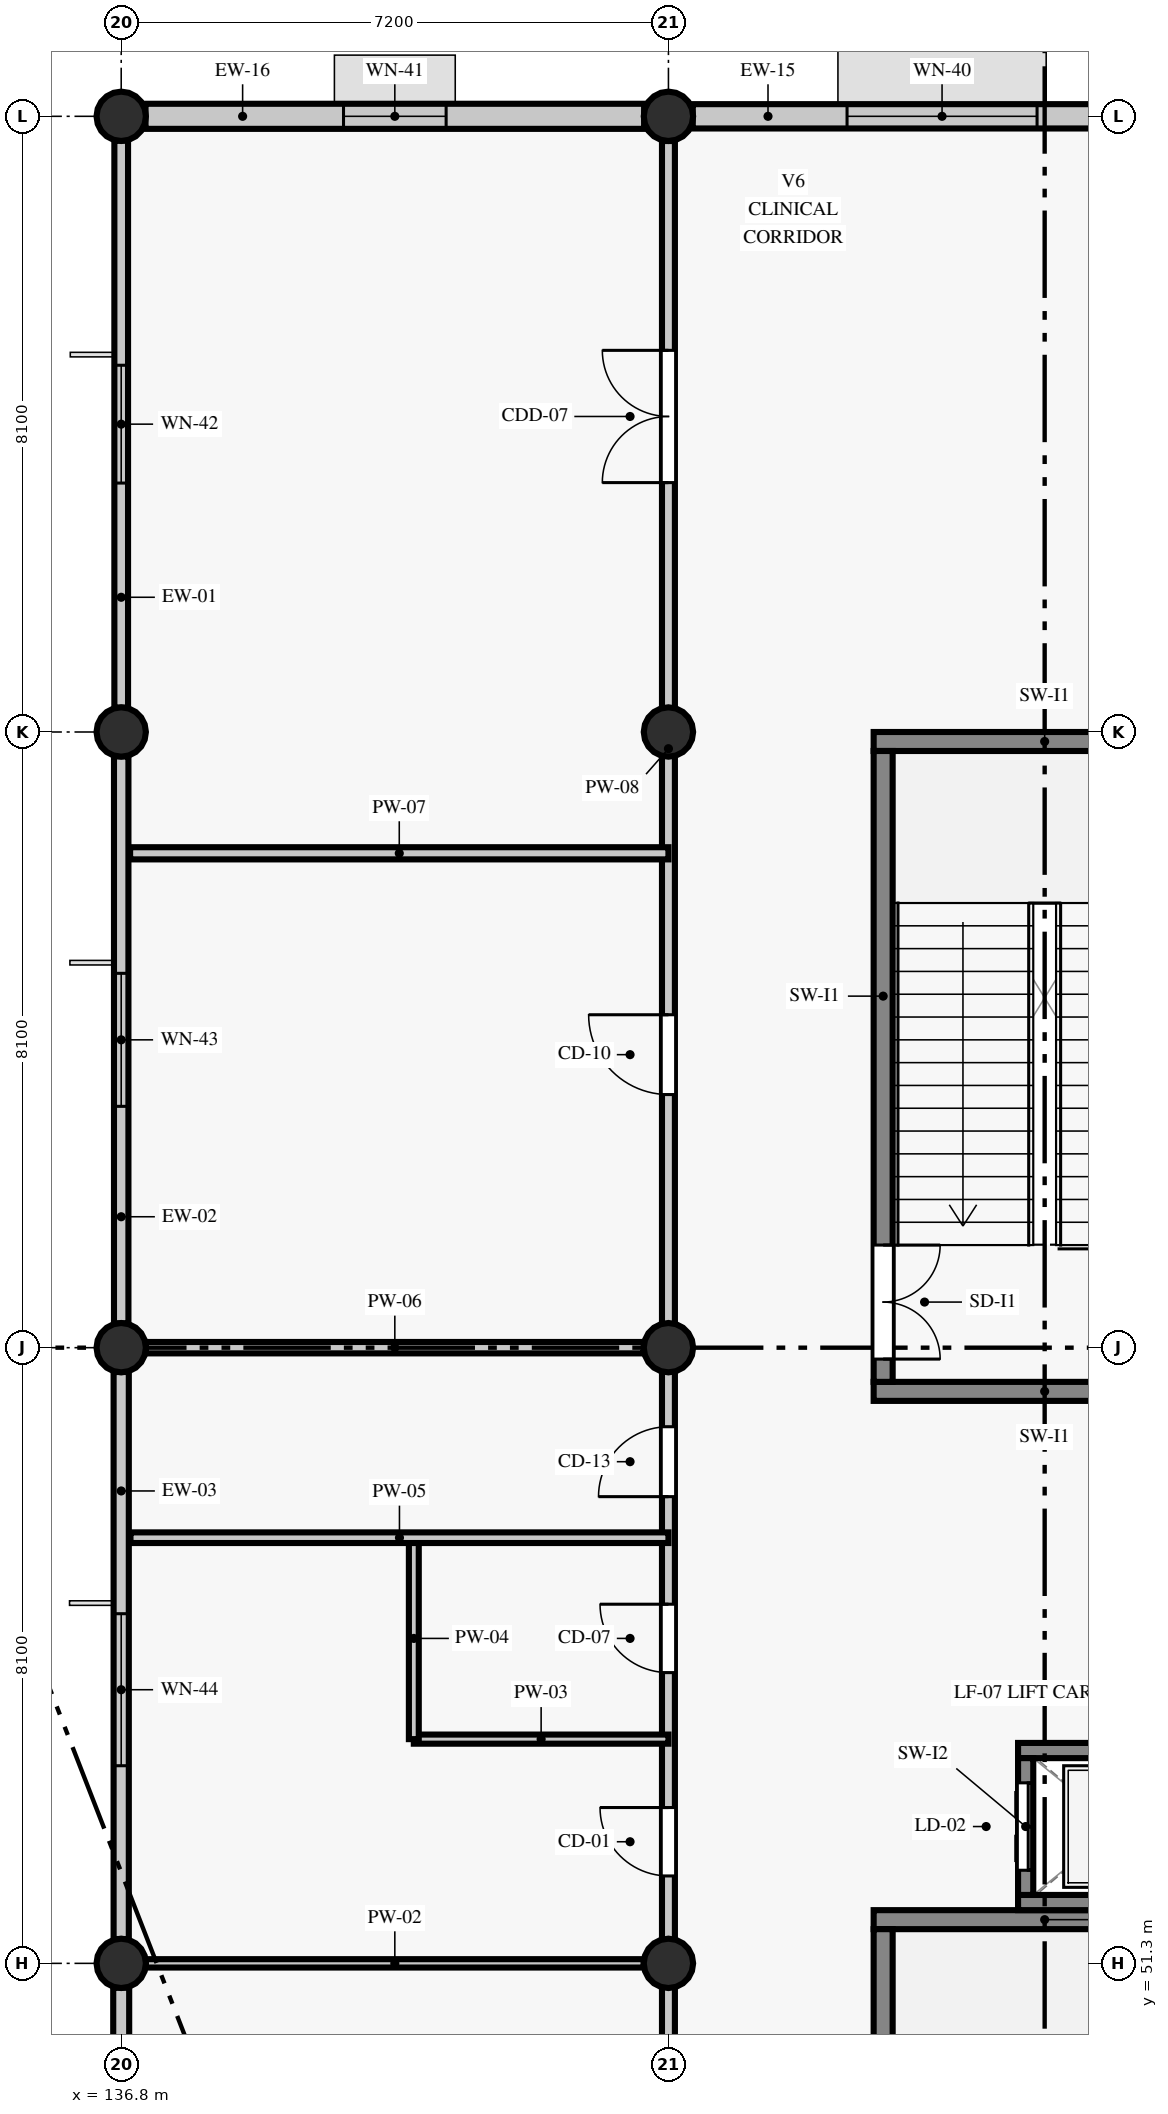
"""IFC4 building model, lengths in metres.
Left out: names, types, materials, properties, quantities, classifications, styles, units other than length and angle.
Written with IfcOpenShell. Run it as: python <this file> out.ifc"""

import sys

from ifc_helpers import new_model, si_unit, direction, frame, frame_2d, origin, origin_2d, place, context, subcontext, project, spatial, rectangle, circle, extrude, element, fill, save


model = new_model("IFC4")
c1 = context("Model", 3, precision=1e-05, world=origin(), true_north=direction((0.0, 1.0)))
c2 = subcontext(c1, "Body", "Model", "MODEL_VIEW")
j1 = project(units=[si_unit("LENGTHUNIT", "METRE"), si_unit("PLANEANGLEUNIT", "RADIAN")], contexts=[c1])
p1 = place(None, origin())
s1 = spatial("IfcSite", under=j1, at=p1, CompositionType="ELEMENT")
p2 = place(p1, origin())
s2 = spatial("IfcBuilding", under=s1, at=p2, CompositionType="ELEMENT")
p3 = place(p2, frame((0.0, 0.0, 4.8)))
s3 = spatial("IfcBuildingStorey", under=s2, at=p3, CompositionType="ELEMENT", Elevation=4.8)
for number, where, z_axis, x_axis in (
    (1, (136.8, 51.3, 0.0), (0.0, 0.0, 1.0), (1.0, 0.0, 0.0)),
    (2, (136.8, 59.4, 0.0), (0.0, 0.0, 1.0), (1.0, 0.0, 0.0)),
):
    element("IfcColumn", number, at=place(p3, frame(where, z_axis=z_axis, x_axis=x_axis)), inside=s3, PredefinedType="COLUMN", context=c2, shape_type="SweptSolid", body=[
        extrude(circle(Radius=0.325, at=origin_2d()), origin(), (0.0, 0.0, 1.0), 4.56),
    ])
for number, where, z_axis, x_axis in (
    (3, (136.8, 67.5, 0.0), (0.0, 0.0, 1.0), (1.0, 0.0, 0.0)),
    (4, (136.8, 75.6, 0.0), (0.0, 0.0, 1.0), (1.0, 0.0, 0.0)),
):
    element("IfcColumn", number, at=place(p3, frame(where, z_axis=z_axis, x_axis=x_axis)), inside=s3, PredefinedType="COLUMN", context=c2, shape_type="SweptSolid", body=[
        extrude(circle(Radius=0.325, at=origin_2d()), origin(), (0.0, 0.0, 1.0), 4.518),
    ])
for number, where, z_axis, x_axis in (
    (5, (144.0, 51.3, 0.0), (0.0, 0.0, 1.0), (1.0, 0.0, 0.0)),
    (6, (144.0, 59.4, 0.0), (0.0, 0.0, 1.0), (1.0, 0.0, 0.0)),
):
    element("IfcColumn", number, at=place(p3, frame(where, z_axis=z_axis, x_axis=x_axis)), inside=s3, PredefinedType="COLUMN", context=c2, shape_type="SweptSolid", body=[
        extrude(circle(Radius=0.325, at=origin_2d()), origin(), (0.0, 0.0, 1.0), 4.56),
    ])
for number, where, z_axis, x_axis in (
    (7, (144.0, 67.5, 0.0), (0.0, 0.0, 1.0), (1.0, 0.0, 0.0)),
    (8, (144.0, 75.6, 0.0), (0.0, 0.0, 1.0), (1.0, 0.0, 0.0)),
):
    element("IfcColumn", number, at=place(p3, frame(where, z_axis=z_axis, x_axis=x_axis)), inside=s3, PredefinedType="COLUMN", context=c2, shape_type="SweptSolid", body=[
        extrude(circle(Radius=0.325, at=origin_2d()), origin(), (0.0, 0.0, 1.0), 4.518),
    ])
p4 = place(p3, frame((150.88, 75.6, 0.0), z_axis=(0.0, 0.0, 1.0), x_axis=(-1.0, 0.0, 0.0)))
e9 = element("IfcWall", 9, at=p4, inside=s3, PredefinedType="STANDARD", context=c2, shape_type="SweptSolid", body=[
    extrude(rectangle(XDim=6.56, YDim=0.32, at=frame_2d((3.28, 0.0))), origin(), (0.0, 0.0, 1.0), 3.868),
])
p5 = place(p4, frame((2.03, 0.0, 0.9)))
e10 = element("IfcOpeningElement", 10, at=p5, cuts=e9, PredefinedType="OPENING", context=c2, shape_type="SweptSolid", body=[
    extrude(rectangle(XDim=2.5, YDim=1.66, at=frame_2d((1.25, 0.83))), frame((0.0, 0.17, 0.0), z_axis=(0.0, -1.0, 0.0), x_axis=(1.0, 0.0, 0.0)), (0.0, 0.0, 1.0), 0.34),
])
p6 = place(p3, frame((143.68, 75.6, 0.0), z_axis=(0.0, 0.0, 1.0), x_axis=(-1.0, 0.0, 0.0)))
e11 = element("IfcWall", 11, at=p6, inside=s3, PredefinedType="STANDARD", context=c2, shape_type="SweptSolid", body=[
    extrude(rectangle(XDim=6.56, YDim=0.33, at=frame_2d((3.28, 0.0))), origin(), (0.0, 0.0, 1.0), 3.868),
])
p7 = place(p6, frame((2.605, 0.0, 0.9)))
e12 = element("IfcOpeningElement", 12, at=p7, cuts=e11, PredefinedType="OPENING", context=c2, shape_type="SweptSolid", body=[
    extrude(rectangle(XDim=1.35, YDim=1.78, at=frame_2d((0.675, 0.89))), frame((0.0, 0.175, 0.0), z_axis=(0.0, -1.0, 0.0), x_axis=(1.0, 0.0, 0.0)), (0.0, 0.0, 1.0), 0.35),
])
p8 = place(p3, frame((136.8, 75.28, 0.0), z_axis=(0.0, 0.0, 1.0), x_axis=(0.0, -1.0, 0.0)))
e13 = element("IfcWall", 13, at=p8, inside=s3, PredefinedType="STANDARD", context=c2, shape_type="SweptSolid", body=[
    extrude(rectangle(XDim=7.46, YDim=0.18, at=frame_2d((3.73, 0.0))), origin(), (0.0, 0.0, 1.0), 3.868),
])
p9 = place(p8, frame((2.955, 0.0, 0.9)))
e14 = element("IfcOpeningElement", 14, at=p9, cuts=e13, PredefinedType="OPENING", context=c2, shape_type="SweptSolid", body=[
    extrude(rectangle(XDim=1.55, YDim=1.78, at=frame_2d((0.775, 0.89))), frame((0.0, 0.1, 0.0), z_axis=(0.0, -1.0, 0.0), x_axis=(1.0, 0.0, 0.0)), (0.0, 0.0, 1.0), 0.2),
])
p10 = place(p3, frame((136.8, 67.18, 0.0), z_axis=(0.0, 0.0, 1.0), x_axis=(0.0, -1.0, 0.0)))
e15 = element("IfcWall", 15, at=p10, inside=s3, PredefinedType="STANDARD", context=c2, shape_type="SweptSolid", body=[
    extrude(rectangle(XDim=7.46, YDim=0.19, at=frame_2d((3.73, 0.0))), origin(), (0.0, 0.0, 1.0), 3.91),
])
p11 = place(p10, frame((2.855, 0.0, 0.9)))
e16 = element("IfcOpeningElement", 16, at=p11, cuts=e15, PredefinedType="OPENING", context=c2, shape_type="SweptSolid", body=[
    extrude(rectangle(XDim=1.75, YDim=1.78, at=frame_2d((0.875, 0.89))), frame((0.0, 0.105, 0.0), z_axis=(0.0, -1.0, 0.0), x_axis=(1.0, 0.0, 0.0)), (0.0, 0.0, 1.0), 0.21),
])
p12 = place(p3, frame((136.8, 59.08, 0.0), z_axis=(0.0, 0.0, 1.0), x_axis=(0.0, -1.0, 0.0)))
e17 = element("IfcWall", 17, at=p12, inside=s3, PredefinedType="STANDARD", context=c2, shape_type="SweptSolid", body=[
    extrude(rectangle(XDim=7.46, YDim=0.2, at=frame_2d((3.73, 0.0))), origin(), (0.0, 0.0, 1.0), 3.91),
])
p13 = place(p12, frame((3.18, 0.0, 0.9)))
e18 = element("IfcOpeningElement", 18, at=p13, cuts=e17, PredefinedType="OPENING", context=c2, shape_type="SweptSolid", body=[
    extrude(rectangle(XDim=2.0, YDim=1.78, at=frame_2d((1.0, 0.89))), frame((0.0, 0.11, 0.0), z_axis=(0.0, -1.0, 0.0), x_axis=(1.0, 0.0, 0.0)), (0.0, 0.0, 1.0), 0.22),
])
p14 = place(p3, frame((136.8, 50.98, 0.0), z_axis=(0.0, 0.0, 1.0), x_axis=(0.0, -1.0, 0.0)))
e19 = element("IfcWall", 19, at=p14, inside=s3, PredefinedType="STANDARD", context=c2, shape_type="SweptSolid", body=[
    extrude(rectangle(XDim=7.46, YDim=0.21, at=frame_2d((3.73, 0.0))), origin(), (0.0, 0.0, 1.0), 3.91),
])
p15 = place(p14, frame((2.605, 0.0, 0.9)))
e20 = element("IfcOpeningElement", 20, at=p15, cuts=e19, PredefinedType="OPENING", context=c2, shape_type="SweptSolid", body=[
    extrude(rectangle(XDim=2.25, YDim=1.78, at=frame_2d((1.125, 0.89))), frame((0.0, 0.115, 0.0), z_axis=(0.0, -1.0, 0.0), x_axis=(1.0, 0.0, 0.0)), (0.0, 0.0, 1.0), 0.23),
])
p16 = place(p3, frame((151.2, 51.875, 0.0), z_axis=(0.0, 0.0, 1.0), x_axis=(-1.0, 0.0, 0.0)))
e21 = element("IfcWall", 21, at=p16, inside=s3, PredefinedType="SHEAR", context=c2, shape_type="SweptSolid", body=[
    extrude(rectangle(XDim=4.5, YDim=0.25, at=frame_2d((2.25, 0.0))), origin(), (0.0, 0.0, 1.0), 4.56),
])
p17 = place(p3, frame((146.825, 51.75, 0.0), z_axis=(0.0, 0.0, 1.0), x_axis=(0.0, -1.0, 0.0)))
e22 = element("IfcWall", 22, at=p17, inside=s3, PredefinedType="SHEAR", context=c2, shape_type="SweptSolid", body=[
    extrude(rectangle(XDim=8.3, YDim=0.25, at=frame_2d((4.15, 0.0))), origin(), (0.0, 0.0, 1.0), 4.56),
])
p18 = place(p17, frame((6.5, 0.0, 0.0)))
e23 = element("IfcOpeningElement", 23, at=p18, cuts=e22, PredefinedType="OPENING", context=c2, shape_type="SweptSolid", body=[
    extrude(rectangle(XDim=1.5, YDim=2.15, at=frame_2d((0.75, 1.075))), frame((0.0, 0.135, 0.0), z_axis=(0.0, -1.0, 0.0), x_axis=(1.0, 0.0, 0.0)), (0.0, 0.0, 1.0), 0.27),
])
for number, where, z_axis, x_axis in (
    (24, (146.7, 58.825, 0.0), (0.0, 0.0, 1.0), (1.0, 0.0, 0.0)),
    (25, (151.2, 67.375, 0.0), (0.0, 0.0, 1.0), (-1.0, 0.0, 0.0)),
):
    element("IfcWall", number, at=place(p3, frame(where, z_axis=z_axis, x_axis=x_axis)), inside=s3, PredefinedType="SHEAR", context=c2, shape_type="SweptSolid", body=[
        extrude(rectangle(XDim=4.5, YDim=0.25, at=frame_2d((2.25, 0.0))), origin(), (0.0, 0.0, 1.0), 4.56),
    ])
p19 = place(p3, frame((146.825, 67.25, 0.0), z_axis=(0.0, 0.0, 1.0), x_axis=(0.0, -1.0, 0.0)))
e26 = element("IfcWall", 26, at=p19, inside=s3, PredefinedType="SHEAR", context=c2, shape_type="SweptSolid", body=[
    extrude(rectangle(XDim=8.3, YDim=0.25, at=frame_2d((4.15, 0.0))), origin(), (0.0, 0.0, 1.0), 4.56),
])
p20 = place(p19, frame((6.5, 0.0, 0.0)))
e27 = element("IfcOpeningElement", 27, at=p20, cuts=e26, PredefinedType="OPENING", context=c2, shape_type="SweptSolid", body=[
    extrude(rectangle(XDim=1.5, YDim=2.15, at=frame_2d((0.75, 1.075))), frame((0.0, 0.135, 0.0), z_axis=(0.0, -1.0, 0.0), x_axis=(1.0, 0.0, 0.0)), (0.0, 0.0, 1.0), 0.27),
])
for number, where, z_axis, x_axis in (
    (28, (148.6, 52.1, 0.0), (0.0, 0.0, 1.0), (1.0, 0.0, 0.0)),
    (29, (151.2, 54.1, 0.0), (0.0, 0.0, 1.0), (-1.0, 0.0, 0.0)),
):
    element("IfcWall", number, at=place(p3, frame(where, z_axis=z_axis, x_axis=x_axis)), inside=s3, PredefinedType="SHEAR", context=c2, shape_type="SweptSolid", body=[
        extrude(rectangle(XDim=2.6, YDim=0.2, at=frame_2d((1.3, 0.0))), origin(), (0.0, 0.0, 1.0), 4.56),
    ])
p21 = place(p3, frame((148.7, 54.0, 0.0), z_axis=(0.0, 0.0, 1.0), x_axis=(0.0, -1.0, 0.0)))
e30 = element("IfcWall", 30, at=p21, inside=s3, PredefinedType="SHEAR", context=c2, shape_type="SweptSolid", body=[
    extrude(rectangle(XDim=1.8, YDim=0.2, at=frame_2d((0.9, 0.0))), origin(), (0.0, 0.0, 1.0), 4.56),
])
p22 = place(p21, frame((0.325, 0.0, 0.0)))
e31 = element("IfcOpeningElement", 31, at=p22, cuts=e30, PredefinedType="OPENING", context=c2, shape_type="SweptSolid", body=[
    extrude(rectangle(XDim=1.15, YDim=2.15, at=frame_2d((0.575, 1.075))), frame((0.0, 0.11, 0.0), z_axis=(0.0, -1.0, 0.0), x_axis=(1.0, 0.0, 0.0)), (0.0, 0.0, 1.0), 0.22),
])
p23 = place(p3, frame((144.0, 43.525, 0.0), z_axis=(0.0, 0.0, 1.0), x_axis=(0.0, 1.0, 0.0)))
e32 = element("IfcWall", 32, at=p23, inside=s3, PredefinedType="PARTITIONING", context=c2, shape_type="SweptSolid", body=[
    extrude(rectangle(XDim=31.75, YDim=0.17, at=frame_2d((15.875, 0.0))), origin(), (0.0, 0.0, 1.0), 4.068),
])
p24 = place(p23, frame((3.218, 0.0, 0.0)))
e33 = element("IfcOpeningElement", 33, at=p24, cuts=e32, PredefinedType="OPENING", context=c2, shape_type="SweptSolid", body=[
    extrude(rectangle(XDim=1.1, YDim=2.08, at=frame_2d((0.55, 1.04))), frame((0.0, 0.095, 0.0), z_axis=(0.0, -1.0, 0.0), x_axis=(1.0, 0.0, 0.0)), (0.0, 0.0, 1.0), 0.19),
])
p25 = place(p23, frame((8.925, 0.0, 0.0)))
e34 = element("IfcOpeningElement", 34, at=p25, cuts=e32, PredefinedType="OPENING", context=c2, shape_type="SweptSolid", body=[
    extrude(rectangle(XDim=0.9, YDim=2.08, at=frame_2d((0.45, 1.04))), frame((0.0, 0.095, 0.0), z_axis=(0.0, -1.0, 0.0), x_axis=(1.0, 0.0, 0.0)), (0.0, 0.0, 1.0), 0.19),
])
p26 = place(p23, frame((11.6, 0.0, 0.0)))
e35 = element("IfcOpeningElement", 35, at=p26, cuts=e32, PredefinedType="OPENING", context=c2, shape_type="SweptSolid", body=[
    extrude(rectangle(XDim=0.9, YDim=2.13, at=frame_2d((0.45, 1.065))), frame((0.0, 0.095, 0.0), z_axis=(0.0, -1.0, 0.0), x_axis=(1.0, 0.0, 0.0)), (0.0, 0.0, 1.0), 0.19),
])
p27 = place(p23, frame((13.915, 0.0, 0.0)))
e36 = element("IfcOpeningElement", 36, at=p27, cuts=e32, PredefinedType="OPENING", context=c2, shape_type="SweptSolid", body=[
    extrude(rectangle(XDim=0.92, YDim=2.18, at=frame_2d((0.46, 1.09))), frame((0.0, 0.095, 0.0), z_axis=(0.0, -1.0, 0.0), x_axis=(1.0, 0.0, 0.0)), (0.0, 0.0, 1.0), 0.19),
])
p28 = place(p23, frame((19.205, 0.0, 0.0)))
e37 = element("IfcOpeningElement", 37, at=p28, cuts=e32, PredefinedType="OPENING", context=c2, shape_type="SweptSolid", body=[
    extrude(rectangle(XDim=1.05, YDim=2.13, at=frame_2d((0.525, 1.065))), frame((0.0, 0.095, 0.0), z_axis=(0.0, -1.0, 0.0), x_axis=(1.0, 0.0, 0.0)), (0.0, 0.0, 1.0), 0.19),
])
p29 = place(p23, frame((27.256, 0.0, 0.0)))
e38 = element("IfcOpeningElement", 38, at=p29, cuts=e32, PredefinedType="OPENING", context=c2, shape_type="SweptSolid", body=[
    extrude(rectangle(XDim=1.74, YDim=2.26, at=frame_2d((0.87, 1.13))), frame((0.0, 0.095, 0.0), z_axis=(0.0, -1.0, 0.0), x_axis=(1.0, 0.0, 0.0)), (0.0, 0.0, 1.0), 0.19),
])
p30 = place(p3, frame((137.125, 51.3, 0.0), z_axis=(0.0, 0.0, 1.0), x_axis=(1.0, 0.0, 0.0)))
e39 = element("IfcWall", 39, at=p30, inside=s3, PredefinedType="PARTITIONING", context=c2, shape_type="SweptSolid", body=[
    extrude(rectangle(XDim=6.55, YDim=0.11, at=frame_2d((3.275, 0.0))), origin(), (0.0, 0.0, 1.0), 3.86),
])
p31 = place(p3, frame((140.65, 54.25, 0.0), z_axis=(0.0, 0.0, 1.0), x_axis=(1.0, 0.0, 0.0)))
e40 = element("IfcWall", 40, at=p31, inside=s3, PredefinedType="PARTITIONING", context=c2, shape_type="SweptSolid", body=[
    extrude(rectangle(XDim=3.35, YDim=0.12, at=frame_2d((1.675, 0.0))), origin(), (0.0, 0.0, 1.0), 4.56),
])
p32 = place(p3, frame((140.65, 54.25, 0.0), z_axis=(0.0, 0.0, 1.0), x_axis=(0.0, 1.0, 0.0)))
e41 = element("IfcWall", 41, at=p32, inside=s3, PredefinedType="PARTITIONING", context=c2, shape_type="SweptSolid", body=[
    extrude(rectangle(XDim=2.65, YDim=0.13, at=frame_2d((1.325, 0.0))), origin(), (0.0, 0.0, 1.0), 4.2),
])
p33 = place(p3, frame((136.922, 56.9, 0.0), z_axis=(0.0, 0.0, 1.0), x_axis=(1.0, 0.0, 0.0)))
e42 = element("IfcWall", 42, at=p33, inside=s3, PredefinedType="PARTITIONING", context=c2, shape_type="SweptSolid", body=[
    extrude(rectangle(XDim=7.078, YDim=0.14, at=frame_2d((3.539, 0.0))), origin(), (0.0, 0.0, 1.0), 4.56),
])
p34 = place(p3, frame((137.125, 59.4, 0.0), z_axis=(0.0, 0.0, 1.0), x_axis=(1.0, 0.0, 0.0)))
e43 = element("IfcWall", 43, at=p34, inside=s3, PredefinedType="PARTITIONING", context=c2, shape_type="SweptSolid", body=[
    extrude(rectangle(XDim=6.55, YDim=0.15, at=frame_2d((3.275, 0.0))), origin(), (0.0, 0.0, 1.0), 3.86),
])
p35 = place(p3, frame((136.917, 65.904, 0.0), z_axis=(0.0, 0.0, 1.0), x_axis=(1.0, 0.0, 0.0)))
e44 = element("IfcWall", 44, at=p35, inside=s3, PredefinedType="PARTITIONING", context=c2, shape_type="SweptSolid", body=[
    extrude(rectangle(XDim=7.083, YDim=0.16, at=frame_2d((3.542, 0.0))), origin(), (0.0, 0.0, 1.0), 4.11),
])
p36 = place(p5, origin())
e45 = element("IfcWindow", 45, at=p36, inside=s3, PartitioningType="SINGLE_PANEL", PredefinedType="WINDOW", context=c2, shape_type="SweptSolid", body=[
    extrude(rectangle(XDim=2.5, YDim=1.66, at=frame_2d((1.25, 0.83))), frame((0.0, 0.03, 0.0), z_axis=(0.0, -1.0, 0.0), x_axis=(1.0, 0.0, 0.0)), (0.0, 0.0, 1.0), 0.06),
])
fill(e10, e45)
p37 = place(p7, origin())
e46 = element("IfcWindow", 46, at=p37, inside=s3, PartitioningType="SINGLE_PANEL", PredefinedType="WINDOW", context=c2, shape_type="SweptSolid", body=[
    extrude(rectangle(XDim=1.35, YDim=1.78, at=frame_2d((0.675, 0.89))), frame((0.0, 0.03, 0.0), z_axis=(0.0, -1.0, 0.0), x_axis=(1.0, 0.0, 0.0)), (0.0, 0.0, 1.0), 0.06),
])
fill(e12, e46)
p38 = place(p9, origin())
e47 = element("IfcWindow", 47, at=p38, inside=s3, PartitioningType="SINGLE_PANEL", PredefinedType="WINDOW", context=c2, shape_type="SweptSolid", body=[
    extrude(rectangle(XDim=1.55, YDim=1.78, at=frame_2d((0.775, 0.89))), frame((0.0, 0.03, 0.0), z_axis=(0.0, -1.0, 0.0), x_axis=(1.0, 0.0, 0.0)), (0.0, 0.0, 1.0), 0.06),
])
fill(e14, e47)
p39 = place(p11, origin())
e48 = element("IfcWindow", 48, at=p39, inside=s3, PartitioningType="SINGLE_PANEL", PredefinedType="WINDOW", context=c2, shape_type="SweptSolid", body=[
    extrude(rectangle(XDim=1.75, YDim=1.78, at=frame_2d((0.875, 0.89))), frame((0.0, 0.03, 0.0), z_axis=(0.0, -1.0, 0.0), x_axis=(1.0, 0.0, 0.0)), (0.0, 0.0, 1.0), 0.06),
])
fill(e16, e48)
p40 = place(p13, origin())
e49 = element("IfcWindow", 49, at=p40, inside=s3, PartitioningType="SINGLE_PANEL", PredefinedType="WINDOW", context=c2, shape_type="SweptSolid", body=[
    extrude(rectangle(XDim=2.0, YDim=1.78, at=frame_2d((1.0, 0.89))), frame((0.0, 0.03, 0.0), z_axis=(0.0, -1.0, 0.0), x_axis=(1.0, 0.0, 0.0)), (0.0, 0.0, 1.0), 0.06),
])
fill(e18, e49)
p41 = place(p20, origin())
e50 = element("IfcDoor", 50, at=p41, inside=s3, OperationType="DOUBLE_DOOR_SINGLE_SWING", PredefinedType="DOOR", context=c2, shape_type="SweptSolid", body=[
    extrude(rectangle(XDim=1.5, YDim=2.15, at=frame_2d((0.75, 1.075))), frame((0.0, 0.025, 0.0), z_axis=(0.0, -1.0, 0.0), x_axis=(1.0, 0.0, 0.0)), (0.0, 0.0, 1.0), 0.05),
])
fill(e27, e50)
p42 = place(p22, frame((1.15, 0.0, 0.0), z_axis=(0.0, 0.0, 1.0), x_axis=(-1.0, 0.0, 0.0)))
e51 = element("IfcDoor", 51, at=p42, inside=s3, OperationType="DOUBLE_DOOR_SLIDING", PredefinedType="DOOR", context=c2, shape_type="SweptSolid", body=[
    extrude(rectangle(XDim=1.15, YDim=2.15, at=frame_2d((0.575, 1.075))), frame((0.0, 0.025, 0.0), z_axis=(0.0, -1.0, 0.0), x_axis=(1.0, 0.0, 0.0)), (0.0, 0.0, 1.0), 0.05),
])
fill(e31, e51)
p43 = place(p25, origin())
e52 = element("IfcDoor", 52, at=p43, inside=s3, OperationType="SINGLE_SWING_RIGHT", PredefinedType="DOOR", context=c2, shape_type="SweptSolid", body=[
    extrude(rectangle(XDim=0.9, YDim=2.08, at=frame_2d((0.45, 1.04))), frame((0.0, 0.025, 0.0), z_axis=(0.0, -1.0, 0.0), x_axis=(1.0, 0.0, 0.0)), (0.0, 0.0, 1.0), 0.05),
])
fill(e34, e52)
p44 = place(p26, origin())
e53 = element("IfcDoor", 53, at=p44, inside=s3, OperationType="SINGLE_SWING_RIGHT", PredefinedType="DOOR", context=c2, shape_type="SweptSolid", body=[
    extrude(rectangle(XDim=0.9, YDim=2.13, at=frame_2d((0.45, 1.065))), frame((0.0, 0.025, 0.0), z_axis=(0.0, -1.0, 0.0), x_axis=(1.0, 0.0, 0.0)), (0.0, 0.0, 1.0), 0.05),
])
fill(e35, e53)
p45 = place(p27, origin())
e54 = element("IfcDoor", 54, at=p45, inside=s3, OperationType="SINGLE_SWING_LEFT", PredefinedType="DOOR", context=c2, shape_type="SweptSolid", body=[
    extrude(rectangle(XDim=0.92, YDim=2.18, at=frame_2d((0.46, 1.09))), frame((0.0, 0.025, 0.0), z_axis=(0.0, -1.0, 0.0), x_axis=(1.0, 0.0, 0.0)), (0.0, 0.0, 1.0), 0.05),
])
fill(e36, e54)
p46 = place(p28, origin())
e55 = element("IfcDoor", 55, at=p46, inside=s3, OperationType="SINGLE_SWING_RIGHT", PredefinedType="DOOR", context=c2, shape_type="SweptSolid", body=[
    extrude(rectangle(XDim=1.05, YDim=2.13, at=frame_2d((0.525, 1.065))), frame((0.0, 0.025, 0.0), z_axis=(0.0, -1.0, 0.0), x_axis=(1.0, 0.0, 0.0)), (0.0, 0.0, 1.0), 0.05),
])
fill(e37, e55)
p47 = place(p29, origin())
e56 = element("IfcDoor", 56, at=p47, inside=s3, OperationType="DOUBLE_DOOR_SINGLE_SWING", PredefinedType="DOOR", context=c2, shape_type="SweptSolid", body=[
    extrude(rectangle(XDim=1.74, YDim=2.26, at=frame_2d((0.87, 1.13))), frame((0.0, 0.025, 0.0), z_axis=(0.0, -1.0, 0.0), x_axis=(1.0, 0.0, 0.0)), (0.0, 0.0, 1.0), 0.05),
])
fill(e38, e56)
save(model, sys.argv[1])
